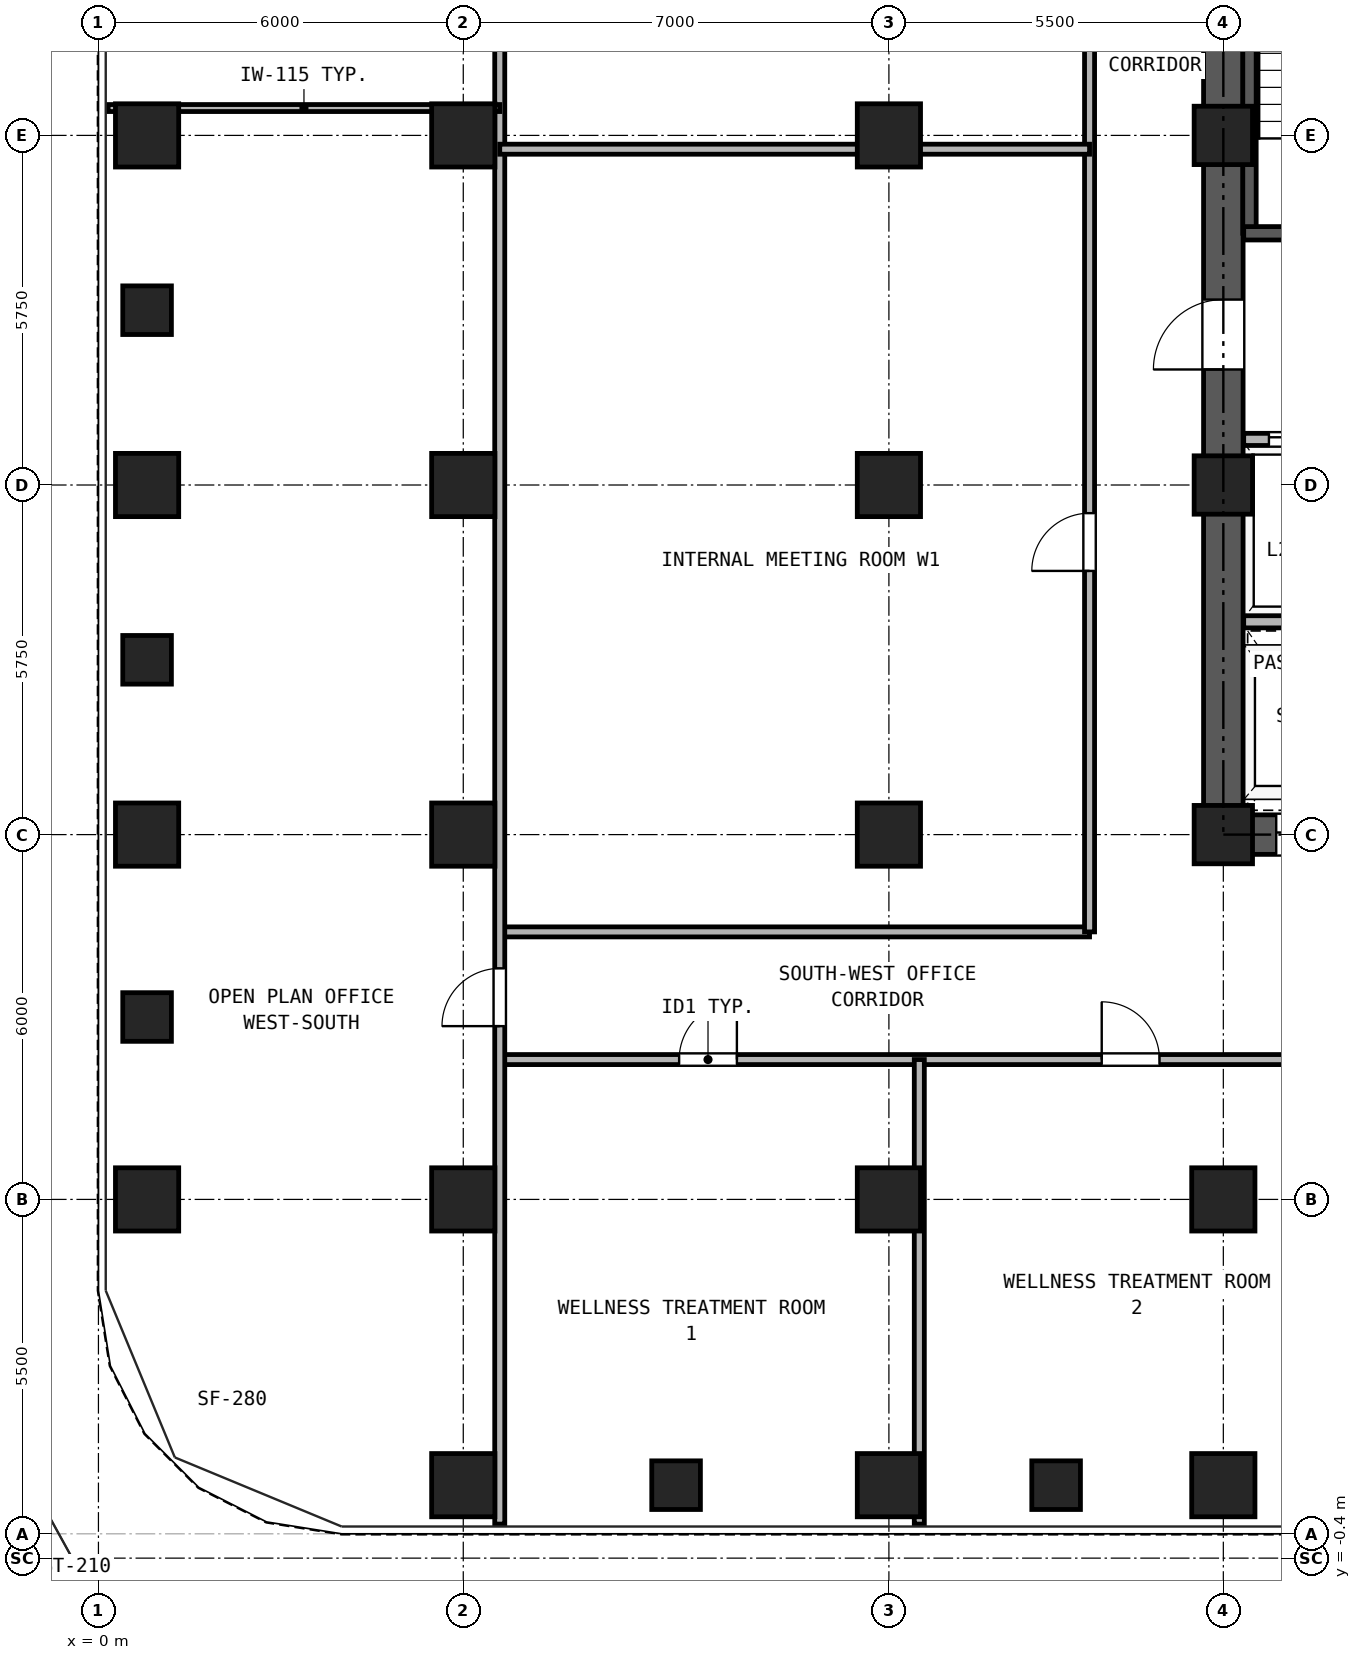
"""IFC4 building model, lengths in metres.
Left out: names, types, materials, properties, quantities, classifications, styles, units other than length and angle.
Written with IfcOpenShell. Run it as: python <this file> out.ifc"""

import sys

from ifc_helpers import new_model, si_unit, direction, frame, frame_2d, origin, origin_2d, place, context, subcontext, project, spatial, rectangle, hollow_rectangle, extrude, source, transform, mapped, element, fill, save


model = new_model("IFC4")
c1 = context("Model", 3, precision=1e-05, world=origin(), true_north=direction((0.0, 1.0)))
c2 = subcontext(c1, "Body", "Model", "MODEL_VIEW")
j1 = project(units=[si_unit("LENGTHUNIT", "METRE"), si_unit("PLANEANGLEUNIT", "RADIAN")], contexts=[c1])
p1 = place(None, origin())
s1 = spatial("IfcSite", under=j1, at=p1, CompositionType="ELEMENT")
p2 = place(p1, origin())
s2 = spatial("IfcBuilding", under=s1, at=p2, CompositionType="ELEMENT")
p3 = place(p2, frame((0.0, 0.0, 81.0)))
s3 = spatial("IfcBuildingStorey", under=s2, at=p3, CompositionType="ELEMENT", Elevation=81.0)
m1 = source(origin(), c2, "Body", "SweptSolid", [
    extrude(hollow_rectangle(XDim=1.04, YDim=1.04, WallThickness=0.065, at=origin_2d()), origin(), (0.0, 0.0, 1.0), 3.32),
])
for number, where, z_axis, x_axis in (
    (1, (6.0, 0.8, 0.0), (0.0, 0.0, 1.0), (1.0, 0.0, 0.0)),
    (2, (13.0, 0.8, 0.0), (0.0, 0.0, 1.0), (1.0, 0.0, 0.0)),
    (3, (18.5, 0.8, 0.0), (0.0, 0.0, 1.0), (1.0, 0.0, 0.0)),
    (4, (0.8, 5.5, 0.0), (0.0, 0.0, 1.0), (1.0, 0.0, 0.0)),
    (5, (0.8, 11.5, 0.0), (0.0, 0.0, 1.0), (1.0, 0.0, 0.0)),
    (6, (0.8, 17.25, 0.0), (0.0, 0.0, 1.0), (1.0, 0.0, 0.0)),
    (7, (0.8, 23.0, 0.0), (0.0, 0.0, 1.0), (1.0, 0.0, 0.0)),
    (8, (6.0, 5.5, 0.0), (0.0, 0.0, 1.0), (1.0, 0.0, 0.0)),
    (9, (6.0, 11.5, 0.0), (0.0, 0.0, 1.0), (1.0, 0.0, 0.0)),
    (10, (6.0, 17.25, 0.0), (0.0, 0.0, 1.0), (1.0, 0.0, 0.0)),
    (11, (6.0, 23.0, 0.0), (0.0, 0.0, 1.0), (1.0, 0.0, 0.0)),
    (12, (13.0, 5.5, 0.0), (0.0, 0.0, 1.0), (1.0, 0.0, 0.0)),
    (13, (13.0, 11.5, 0.0), (0.0, 0.0, 1.0), (1.0, 0.0, 0.0)),
    (14, (13.0, 17.25, 0.0), (0.0, 0.0, 1.0), (1.0, 0.0, 0.0)),
    (15, (13.0, 23.0, 0.0), (0.0, 0.0, 1.0), (1.0, 0.0, 0.0)),
    (16, (18.5, 5.5, 0.0), (0.0, 0.0, 1.0), (1.0, 0.0, 0.0)),
):
    element("IfcColumn", number, at=place(p3, frame(where, z_axis=z_axis, x_axis=x_axis)), inside=s3, PredefinedType="COLUMN", context=c2, shape_type="MappedRepresentation", body=[
        mapped(m1, transform((0.0, 0.0, 0.0), x_axis=(1.0, 0.0, 0.0), y_axis=(0.0, 1.0, 0.0), z_axis=(0.0, 0.0, 1.0), scale=1.0)),
    ])
m2 = source(origin(), c2, "Body", "SweptSolid", [
    extrude(hollow_rectangle(XDim=0.96, YDim=0.96, WallThickness=0.06, at=origin_2d()), origin(), (0.0, 0.0, 1.0), 3.32),
])
for number, where, z_axis, x_axis in (
    (17, (18.5, 11.5, 0.0), (0.0, 0.0, 1.0), (1.0, 0.0, 0.0)),
    (18, (18.5, 17.25, 0.0), (0.0, 0.0, 1.0), (1.0, 0.0, 0.0)),
    (19, (18.5, 23.0, 0.0), (0.0, 0.0, 1.0), (1.0, 0.0, 0.0)),
):
    element("IfcColumn", number, at=place(p3, frame(where, z_axis=z_axis, x_axis=x_axis)), inside=s3, PredefinedType="COLUMN", context=c2, shape_type="MappedRepresentation", body=[
        mapped(m2, transform((0.0, 0.0, 0.0), x_axis=(1.0, 0.0, 0.0), y_axis=(0.0, 1.0, 0.0), z_axis=(0.0, 0.0, 1.0), scale=1.0)),
    ])
m3 = source(origin(), c2, "Body", "SweptSolid", [
    extrude(hollow_rectangle(XDim=0.8, YDim=0.8, WallThickness=0.045, at=origin_2d()), origin(), (0.0, 0.0, 1.0), 3.32),
])
for number, where, z_axis, x_axis in (
    (20, (9.5, 0.8, 0.0), (0.0, 0.0, 1.0), (1.0, 0.0, 0.0)),
    (21, (15.75, 0.8, 0.0), (0.0, 0.0, 1.0), (1.0, 0.0, 0.0)),
    (22, (0.8, 8.5, 0.0), (0.0, 0.0, 1.0), (1.0, 0.0, 0.0)),
    (23, (0.8, 14.375, 0.0), (0.0, 0.0, 1.0), (1.0, 0.0, 0.0)),
    (24, (0.8, 20.125, 0.0), (0.0, 0.0, 1.0), (1.0, 0.0, 0.0)),
):
    element("IfcColumn", number, at=place(p3, frame(where, z_axis=z_axis, x_axis=x_axis)), inside=s3, PredefinedType="COLUMN", context=c2, shape_type="MappedRepresentation", body=[
        mapped(m3, transform((0.0, 0.0, 0.0), x_axis=(1.0, 0.0, 0.0), y_axis=(0.0, 1.0, 0.0), z_axis=(0.0, 0.0, 1.0), scale=1.0)),
    ])
p4 = place(p3, frame((18.175, 11.5, 0.0), z_axis=(0.0, 0.0, 1.0), x_axis=(1.0, 0.0, 0.0)))
e25 = element("IfcWall", 25, at=p4, inside=s3, PredefinedType="SHEAR", context=c2, shape_type="SweptSolid", body=[
    extrude(rectangle(XDim=10.65, YDim=0.65, at=frame_2d((5.325, 0.0))), origin(), (0.0, 0.0, 1.0), 3.32),
])
p5 = place(p4, frame((1.195, 0.0, 0.0)))
e26 = element("IfcOpeningElement", 26, at=p5, cuts=e25, PredefinedType="OPENING", context=c2, shape_type="SweptSolid", body=[
    extrude(rectangle(XDim=1.1, YDim=2.25, at=frame_2d((0.55, 1.125))), frame((0.0, 0.335, 0.0), z_axis=(0.0, -1.0, 0.0), x_axis=(1.0, 0.0, 0.0)), (0.0, 0.0, 1.0), 0.67),
])
p6 = place(p4, frame((3.495, 0.0, 0.0)))
e27 = element("IfcOpeningElement", 27, at=p6, cuts=e25, PredefinedType="OPENING", context=c2, shape_type="SweptSolid", body=[
    extrude(rectangle(XDim=1.1, YDim=2.25, at=frame_2d((0.55, 1.125))), frame((0.0, 0.335, 0.0), z_axis=(0.0, -1.0, 0.0), x_axis=(1.0, 0.0, 0.0)), (0.0, 0.0, 1.0), 0.67),
])
p7 = place(p4, frame((5.925, 0.0, 0.0)))
e28 = element("IfcOpeningElement", 28, at=p7, cuts=e25, PredefinedType="OPENING", context=c2, shape_type="SweptSolid", body=[
    extrude(rectangle(XDim=1.1, YDim=2.25, at=frame_2d((0.55, 1.125))), frame((0.0, 0.335, 0.0), z_axis=(0.0, -1.0, 0.0), x_axis=(1.0, 0.0, 0.0)), (0.0, 0.0, 1.0), 0.67),
])
p8 = place(p4, frame((8.325, 0.0, 0.0)))
e29 = element("IfcOpeningElement", 29, at=p8, cuts=e25, PredefinedType="OPENING", context=c2, shape_type="SweptSolid", body=[
    extrude(rectangle(XDim=1.1, YDim=2.25, at=frame_2d((0.55, 1.125))), frame((0.0, 0.335, 0.0), z_axis=(0.0, -1.0, 0.0), x_axis=(1.0, 0.0, 0.0)), (0.0, 0.0, 1.0), 0.67),
])
p9 = place(p3, frame((18.5, 11.825, 0.0), z_axis=(0.0, 0.0, 1.0), x_axis=(0.0, 1.0, 0.0)))
e30 = element("IfcWall", 30, at=p9, inside=s3, PredefinedType="SHEAR", context=c2, shape_type="SweptSolid", body=[
    extrude(rectangle(XDim=16.6, YDim=0.65, at=frame_2d((8.3, 0.0))), origin(), (0.0, 0.0, 1.0), 3.32),
])
p10 = place(p9, frame((7.325, 0.0, 0.0)))
e31 = element("IfcOpeningElement", 31, at=p10, cuts=e30, PredefinedType="OPENING", context=c2, shape_type="SweptSolid", body=[
    extrude(rectangle(XDim=1.15, YDim=2.2, at=frame_2d((0.575, 1.1))), frame((0.0, 0.335, 0.0), z_axis=(0.0, -1.0, 0.0), x_axis=(1.0, 0.0, 0.0)), (0.0, 0.0, 1.0), 0.67),
])
p11 = place(p3, frame((18.93, 21.39, 0.0), z_axis=(0.0, 0.0, 1.0), x_axis=(0.0, 1.0, 0.0)))
e32 = element("IfcWall", 32, at=p11, inside=s3, PredefinedType="SOLIDWALL", context=c2, shape_type="SweptSolid", body=[
    extrude(rectangle(XDim=7.11, YDim=0.22, at=frame_2d((3.555, 0.0))), origin(), (0.0, 0.0, 1.0), 3.32),
])
p12 = place(p3, frame((18.835, 21.39, 0.0), z_axis=(0.0, 0.0, 1.0), x_axis=(1.0, 0.0, 0.0)))
e33 = element("IfcWall", 33, at=p12, inside=s3, PredefinedType="SOLIDWALL", context=c2, shape_type="SweptSolid", body=[
    extrude(rectangle(XDim=6.295, YDim=0.22, at=frame_2d((3.147, 0.0))), origin(), (0.0, 0.0, 1.0), 3.32),
])
p13 = place(p12, frame((1.015, 0.0, 0.0)))
e34 = element("IfcOpeningElement", 34, at=p13, cuts=e33, PredefinedType="OPENING", context=c2, shape_type="SweptSolid", body=[
    extrude(rectangle(XDim=1.15, YDim=2.2, at=frame_2d((0.575, 1.1))), frame((0.0, 0.12, 0.0), z_axis=(0.0, -1.0, 0.0), x_axis=(1.0, 0.0, 0.0)), (0.0, 0.0, 1.0), 0.24),
])
p14 = place(p12, frame((4.745, 0.0, 0.0)))
e35 = element("IfcOpeningElement", 35, at=p14, cuts=e33, PredefinedType="OPENING", context=c2, shape_type="SweptSolid", body=[
    extrude(rectangle(XDim=1.1, YDim=2.25, at=frame_2d((0.55, 1.125))), frame((0.0, 0.12, 0.0), z_axis=(0.0, -1.0, 0.0), x_axis=(1.0, 0.0, 0.0)), (0.0, 0.0, 1.0), 0.24),
])
p15 = place(p3, frame((18.835, 18.0, 0.0), z_axis=(0.0, 0.0, 1.0), x_axis=(1.0, 0.0, 0.0)))
e36 = element("IfcWall", 36, at=p15, inside=s3, PredefinedType="PARTITIONING", context=c2, shape_type="SweptSolid", body=[
    extrude(rectangle(XDim=9.33, YDim=0.2, at=frame_2d((4.665, 0.0))), origin(), (0.0, 0.0, 1.0), 3.32),
])
p16 = place(p15, frame((0.415, 0.0, 0.0)))
e37 = element("IfcOpeningElement", 37, at=p16, cuts=e36, PredefinedType="OPENING", context=c2, shape_type="SweptSolid", body=[
    extrude(rectangle(XDim=1.3, YDim=2.3, at=frame_2d((0.65, 1.15))), frame((0.0, 0.11, 0.0), z_axis=(0.0, -1.0, 0.0), x_axis=(1.0, 0.0, 0.0)), (0.0, 0.0, 1.0), 0.22),
])
p17 = place(p15, frame((2.515, 0.0, 0.0)))
e38 = element("IfcOpeningElement", 38, at=p17, cuts=e36, PredefinedType="OPENING", context=c2, shape_type="SweptSolid", body=[
    extrude(rectangle(XDim=1.3, YDim=2.3, at=frame_2d((0.65, 1.15))), frame((0.0, 0.11, 0.0), z_axis=(0.0, -1.0, 0.0), x_axis=(1.0, 0.0, 0.0)), (0.0, 0.0, 1.0), 0.22),
])
p18 = place(p15, frame((4.935, 0.0, 0.0)))
e39 = element("IfcOpeningElement", 39, at=p18, cuts=e36, PredefinedType="OPENING", context=c2, shape_type="SweptSolid", body=[
    extrude(rectangle(XDim=0.9, YDim=2.05, at=frame_2d((0.45, 1.025))), frame((0.0, 0.11, 0.0), z_axis=(0.0, -1.0, 0.0), x_axis=(1.0, 0.0, 0.0)), (0.0, 0.0, 1.0), 0.22),
])
p19 = place(p15, frame((8.065, 0.0, 0.0)))
e40 = element("IfcOpeningElement", 40, at=p19, cuts=e36, PredefinedType="OPENING", context=c2, shape_type="SweptSolid", body=[
    extrude(rectangle(XDim=0.9, YDim=2.05, at=frame_2d((0.45, 1.025))), frame((0.0, 0.11, 0.0), z_axis=(0.0, -1.0, 0.0), x_axis=(1.0, 0.0, 0.0)), (0.0, 0.0, 1.0), 0.22),
])
p20 = place(p3, frame((18.835, 15.0, 0.0), z_axis=(0.0, 0.0, 1.0), x_axis=(1.0, 0.0, 0.0)))
e41 = element("IfcWall", 41, at=p20, inside=s3, PredefinedType="PARTITIONING", context=c2, shape_type="SweptSolid", body=[
    extrude(rectangle(XDim=9.33, YDim=0.2, at=frame_2d((4.665, 0.0))), origin(), (0.0, 0.0, 1.0), 3.32),
])
p21 = place(p3, frame((6.6, 7.8, 0.0), z_axis=(0.0, 0.0, 1.0), x_axis=(1.0, 0.0, 0.0)))
e42 = element("IfcWall", 42, at=p21, inside=s3, PredefinedType="PARTITIONING", context=c2, shape_type="SweptSolid", body=[
    extrude(rectangle(XDim=33.8, YDim=0.165, at=frame_2d((16.9, 0.0))), origin(), (0.0, 0.0, 1.0), 3.32),
])
p22 = place(p21, frame((2.95, 0.0, 0.0)))
e43 = element("IfcOpeningElement", 43, at=p22, cuts=e42, PredefinedType="OPENING", context=c2, shape_type="SweptSolid", body=[
    extrude(rectangle(XDim=0.95, YDim=2.15, at=frame_2d((0.475, 1.075))), frame((0.0, 0.093, 0.0), z_axis=(0.0, -1.0, 0.0), x_axis=(1.0, 0.0, 0.0)), (0.0, 0.0, 1.0), 0.185),
])
p23 = place(p21, frame((9.9, 0.0, 0.0)))
e44 = element("IfcOpeningElement", 44, at=p23, cuts=e42, PredefinedType="OPENING", context=c2, shape_type="SweptSolid", body=[
    extrude(rectangle(XDim=0.95, YDim=2.15, at=frame_2d((0.475, 1.075))), frame((0.0, 0.093, 0.0), z_axis=(0.0, -1.0, 0.0), x_axis=(1.0, 0.0, 0.0)), (0.0, 0.0, 1.0), 0.185),
])
p24 = place(p21, frame((16.9, 0.0, 0.0)))
e45 = element("IfcOpeningElement", 45, at=p24, cuts=e42, PredefinedType="OPENING", context=c2, shape_type="SweptSolid", body=[
    extrude(rectangle(XDim=0.95, YDim=2.15, at=frame_2d((0.475, 1.075))), frame((0.0, 0.093, 0.0), z_axis=(0.0, -1.0, 0.0), x_axis=(1.0, 0.0, 0.0)), (0.0, 0.0, 1.0), 0.185),
])
p25 = place(p21, frame((23.4, 0.0, 0.0)))
e46 = element("IfcOpeningElement", 46, at=p25, cuts=e42, PredefinedType="OPENING", context=c2, shape_type="SweptSolid", body=[
    extrude(rectangle(XDim=0.95, YDim=2.15, at=frame_2d((0.475, 1.075))), frame((0.0, 0.093, 0.0), z_axis=(0.0, -1.0, 0.0), x_axis=(1.0, 0.0, 0.0)), (0.0, 0.0, 1.0), 0.185),
])
p26 = place(p21, frame((28.25, 0.0, 0.0)))
e47 = element("IfcOpeningElement", 47, at=p26, cuts=e42, PredefinedType="OPENING", context=c2, shape_type="SweptSolid", body=[
    extrude(rectangle(XDim=0.92, YDim=2.1, at=frame_2d((0.46, 1.05))), frame((0.0, 0.093, 0.0), z_axis=(0.0, -1.0, 0.0), x_axis=(1.0, 0.0, 0.0)), (0.0, 0.0, 1.0), 0.185),
])
p27 = place(p21, frame((31.7, 0.0, 0.0)))
e48 = element("IfcOpeningElement", 48, at=p27, cuts=e42, PredefinedType="OPENING", context=c2, shape_type="SweptSolid", body=[
    extrude(rectangle(XDim=0.92, YDim=2.1, at=frame_2d((0.46, 1.05))), frame((0.0, 0.093, 0.0), z_axis=(0.0, -1.0, 0.0), x_axis=(1.0, 0.0, 0.0)), (0.0, 0.0, 1.0), 0.185),
])
p28 = place(p3, frame((6.6, 9.9, 0.0), z_axis=(0.0, 0.0, 1.0), x_axis=(1.0, 0.0, 0.0)))
e49 = element("IfcWall", 49, at=p28, inside=s3, PredefinedType="PARTITIONING", context=c2, shape_type="SweptSolid", body=[
    extrude(rectangle(XDim=9.7, YDim=0.165, at=frame_2d((4.85, 0.0))), origin(), (0.0, 0.0, 1.0), 3.32),
])
p29 = place(p3, frame((16.3, 9.9, 0.0), z_axis=(0.0, 0.0, 1.0), x_axis=(0.0, 1.0, 0.0)))
e50 = element("IfcWall", 50, at=p29, inside=s3, PredefinedType="PARTITIONING", context=c2, shape_type="SweptSolid", body=[
    extrude(rectangle(XDim=19.95, YDim=0.165, at=frame_2d((9.975, 0.0))), origin(), (0.0, 0.0, 1.0), 3.32),
])
p30 = place(p29, frame((5.937, 0.0, 0.0)))
e51 = element("IfcOpeningElement", 51, at=p30, cuts=e50, PredefinedType="OPENING", context=c2, shape_type="SweptSolid", body=[
    extrude(rectangle(XDim=0.95, YDim=2.15, at=frame_2d((0.475, 1.075))), frame((0.0, 0.093, 0.0), z_axis=(0.0, -1.0, 0.0), x_axis=(1.0, 0.0, 0.0)), (0.0, 0.0, 1.0), 0.185),
])
p31 = place(p29, frame((15.911, 0.0, 0.0)))
e52 = element("IfcOpeningElement", 52, at=p31, cuts=e50, PredefinedType="OPENING", context=c2, shape_type="SweptSolid", body=[
    extrude(rectangle(XDim=0.95, YDim=2.15, at=frame_2d((0.475, 1.075))), frame((0.0, 0.093, 0.0), z_axis=(0.0, -1.0, 0.0), x_axis=(1.0, 0.0, 0.0)), (0.0, 0.0, 1.0), 0.185),
])
p32 = place(p3, frame((6.6, 0.16, 0.0), z_axis=(0.0, 0.0, 1.0), x_axis=(0.0, 1.0, 0.0)))
e53 = element("IfcWall", 53, at=p32, inside=s3, PredefinedType="PARTITIONING", context=c2, shape_type="SweptSolid", body=[
    extrude(rectangle(XDim=40.18, YDim=0.165, at=frame_2d((20.09, 0.0))), origin(), (0.0, 0.0, 1.0), 3.32),
])
p33 = place(p32, frame((8.19, 0.0, 0.0)))
e54 = element("IfcOpeningElement", 54, at=p33, cuts=e53, PredefinedType="OPENING", context=c2, shape_type="SweptSolid", body=[
    extrude(rectangle(XDim=0.95, YDim=2.15, at=frame_2d((0.475, 1.075))), frame((0.0, 0.093, 0.0), z_axis=(0.0, -1.0, 0.0), x_axis=(1.0, 0.0, 0.0)), (0.0, 0.0, 1.0), 0.185),
])
p34 = place(p32, frame((30.24, 0.0, 0.0)))
e55 = element("IfcOpeningElement", 55, at=p34, cuts=e53, PredefinedType="OPENING", context=c2, shape_type="SweptSolid", body=[
    extrude(rectangle(XDim=0.95, YDim=2.15, at=frame_2d((0.475, 1.075))), frame((0.0, 0.093, 0.0), z_axis=(0.0, -1.0, 0.0), x_axis=(1.0, 0.0, 0.0)), (0.0, 0.0, 1.0), 0.185),
])
p35 = place(p3, frame((13.5, 0.16, 0.0), z_axis=(0.0, 0.0, 1.0), x_axis=(0.0, 1.0, 0.0)))
e56 = element("IfcWall", 56, at=p35, inside=s3, PredefinedType="PARTITIONING", context=c2, shape_type="SweptSolid", body=[
    extrude(rectangle(XDim=7.64, YDim=0.165, at=frame_2d((3.82, 0.0))), origin(), (0.0, 0.0, 1.0), 3.32),
])
p36 = place(p3, frame((0.16, 23.45, 0.0), z_axis=(0.0, 0.0, 1.0), x_axis=(1.0, 0.0, 0.0)))
e57 = element("IfcWall", 57, at=p36, inside=s3, PredefinedType="PARTITIONING", context=c2, shape_type="SweptSolid", body=[
    extrude(rectangle(XDim=6.44, YDim=0.115, at=frame_2d((3.22, 0.0))), origin(), (0.0, 0.0, 1.0), 3.32),
])
p37 = place(p3, frame((6.6, 22.773, 0.0), z_axis=(0.0, 0.0, 1.0), x_axis=(1.0, 0.0, 0.0)))
e58 = element("IfcWall", 58, at=p37, inside=s3, PredefinedType="PARTITIONING", context=c2, shape_type="SweptSolid", body=[
    extrude(rectangle(XDim=9.7, YDim=0.165, at=frame_2d((4.85, 0.0))), origin(), (0.0, 0.0, 1.0), 2.539),
])
p38 = place(p16, origin())
e59 = element("IfcDoor", 59, at=p38, inside=s3, OperationType="DOUBLE_DOOR_SLIDING", PredefinedType="DOOR", context=c2, shape_type="SweptSolid", body=[
    extrude(rectangle(XDim=1.3, YDim=2.3, at=frame_2d((0.65, 1.15))), frame((0.0, 0.025, 0.0), z_axis=(0.0, -1.0, 0.0), x_axis=(1.0, 0.0, 0.0)), (0.0, 0.0, 1.0), 0.05),
])
fill(e37, e59)
p39 = place(p10, frame((1.15, 0.0, 0.0), z_axis=(0.0, 0.0, 1.0), x_axis=(-1.0, 0.0, 0.0)))
e60 = element("IfcDoor", 60, at=p39, inside=s3, OperationType="SINGLE_SWING_LEFT", PredefinedType="DOOR", context=c2, shape_type="SweptSolid", body=[
    extrude(rectangle(XDim=1.15, YDim=2.2, at=frame_2d((0.575, 1.1))), frame((0.0, 0.025, 0.0), z_axis=(0.0, -1.0, 0.0), x_axis=(1.0, 0.0, 0.0)), (0.0, 0.0, 1.0), 0.05),
])
fill(e31, e60)
p40 = place(p5, frame((1.1, 0.0, 0.0), z_axis=(0.0, 0.0, 1.0), x_axis=(-1.0, 0.0, 0.0)))
e61 = element("IfcDoor", 61, at=p40, inside=s3, OperationType="DOUBLE_DOOR_SLIDING", PredefinedType="DOOR", context=c2, shape_type="SweptSolid", body=[
    extrude(rectangle(XDim=1.1, YDim=2.25, at=frame_2d((0.55, 1.125))), frame((0.0, 0.025, 0.0), z_axis=(0.0, -1.0, 0.0), x_axis=(1.0, 0.0, 0.0)), (0.0, 0.0, 1.0), 0.05),
])
fill(e26, e61)
p41 = place(p22, frame((0.95, 0.0, 0.0), z_axis=(0.0, 0.0, 1.0), x_axis=(-1.0, 0.0, 0.0)))
e62 = element("IfcDoor", 62, at=p41, inside=s3, OperationType="SINGLE_SWING_RIGHT", PredefinedType="DOOR", context=c2, shape_type="SweptSolid", body=[
    extrude(rectangle(XDim=0.95, YDim=2.15, at=frame_2d((0.475, 1.075))), frame((0.0, 0.025, 0.0), z_axis=(0.0, -1.0, 0.0), x_axis=(1.0, 0.0, 0.0)), (0.0, 0.0, 1.0), 0.05),
])
fill(e43, e62)
p42 = place(p23, frame((0.95, 0.0, 0.0), z_axis=(0.0, 0.0, 1.0), x_axis=(-1.0, 0.0, 0.0)))
e63 = element("IfcDoor", 63, at=p42, inside=s3, OperationType="SINGLE_SWING_LEFT", PredefinedType="DOOR", context=c2, shape_type="SweptSolid", body=[
    extrude(rectangle(XDim=0.95, YDim=2.15, at=frame_2d((0.475, 1.075))), frame((0.0, 0.025, 0.0), z_axis=(0.0, -1.0, 0.0), x_axis=(1.0, 0.0, 0.0)), (0.0, 0.0, 1.0), 0.05),
])
fill(e44, e63)
p43 = place(p33, frame((0.95, 0.0, 0.0), z_axis=(0.0, 0.0, 1.0), x_axis=(-1.0, 0.0, 0.0)))
e64 = element("IfcDoor", 64, at=p43, inside=s3, OperationType="SINGLE_SWING_LEFT", PredefinedType="DOOR", context=c2, shape_type="SweptSolid", body=[
    extrude(rectangle(XDim=0.95, YDim=2.15, at=frame_2d((0.475, 1.075))), frame((0.0, 0.025, 0.0), z_axis=(0.0, -1.0, 0.0), x_axis=(1.0, 0.0, 0.0)), (0.0, 0.0, 1.0), 0.05),
])
fill(e54, e64)
p44 = place(p30, frame((0.95, 0.0, 0.0), z_axis=(0.0, 0.0, 1.0), x_axis=(-1.0, 0.0, 0.0)))
e65 = element("IfcDoor", 65, at=p44, inside=s3, OperationType="SINGLE_SWING_LEFT", PredefinedType="DOOR", context=c2, shape_type="SweptSolid", body=[
    extrude(rectangle(XDim=0.95, YDim=2.15, at=frame_2d((0.475, 1.075))), frame((0.0, 0.025, 0.0), z_axis=(0.0, -1.0, 0.0), x_axis=(1.0, 0.0, 0.0)), (0.0, 0.0, 1.0), 0.05),
])
fill(e51, e65)
save(model, sys.argv[1])
